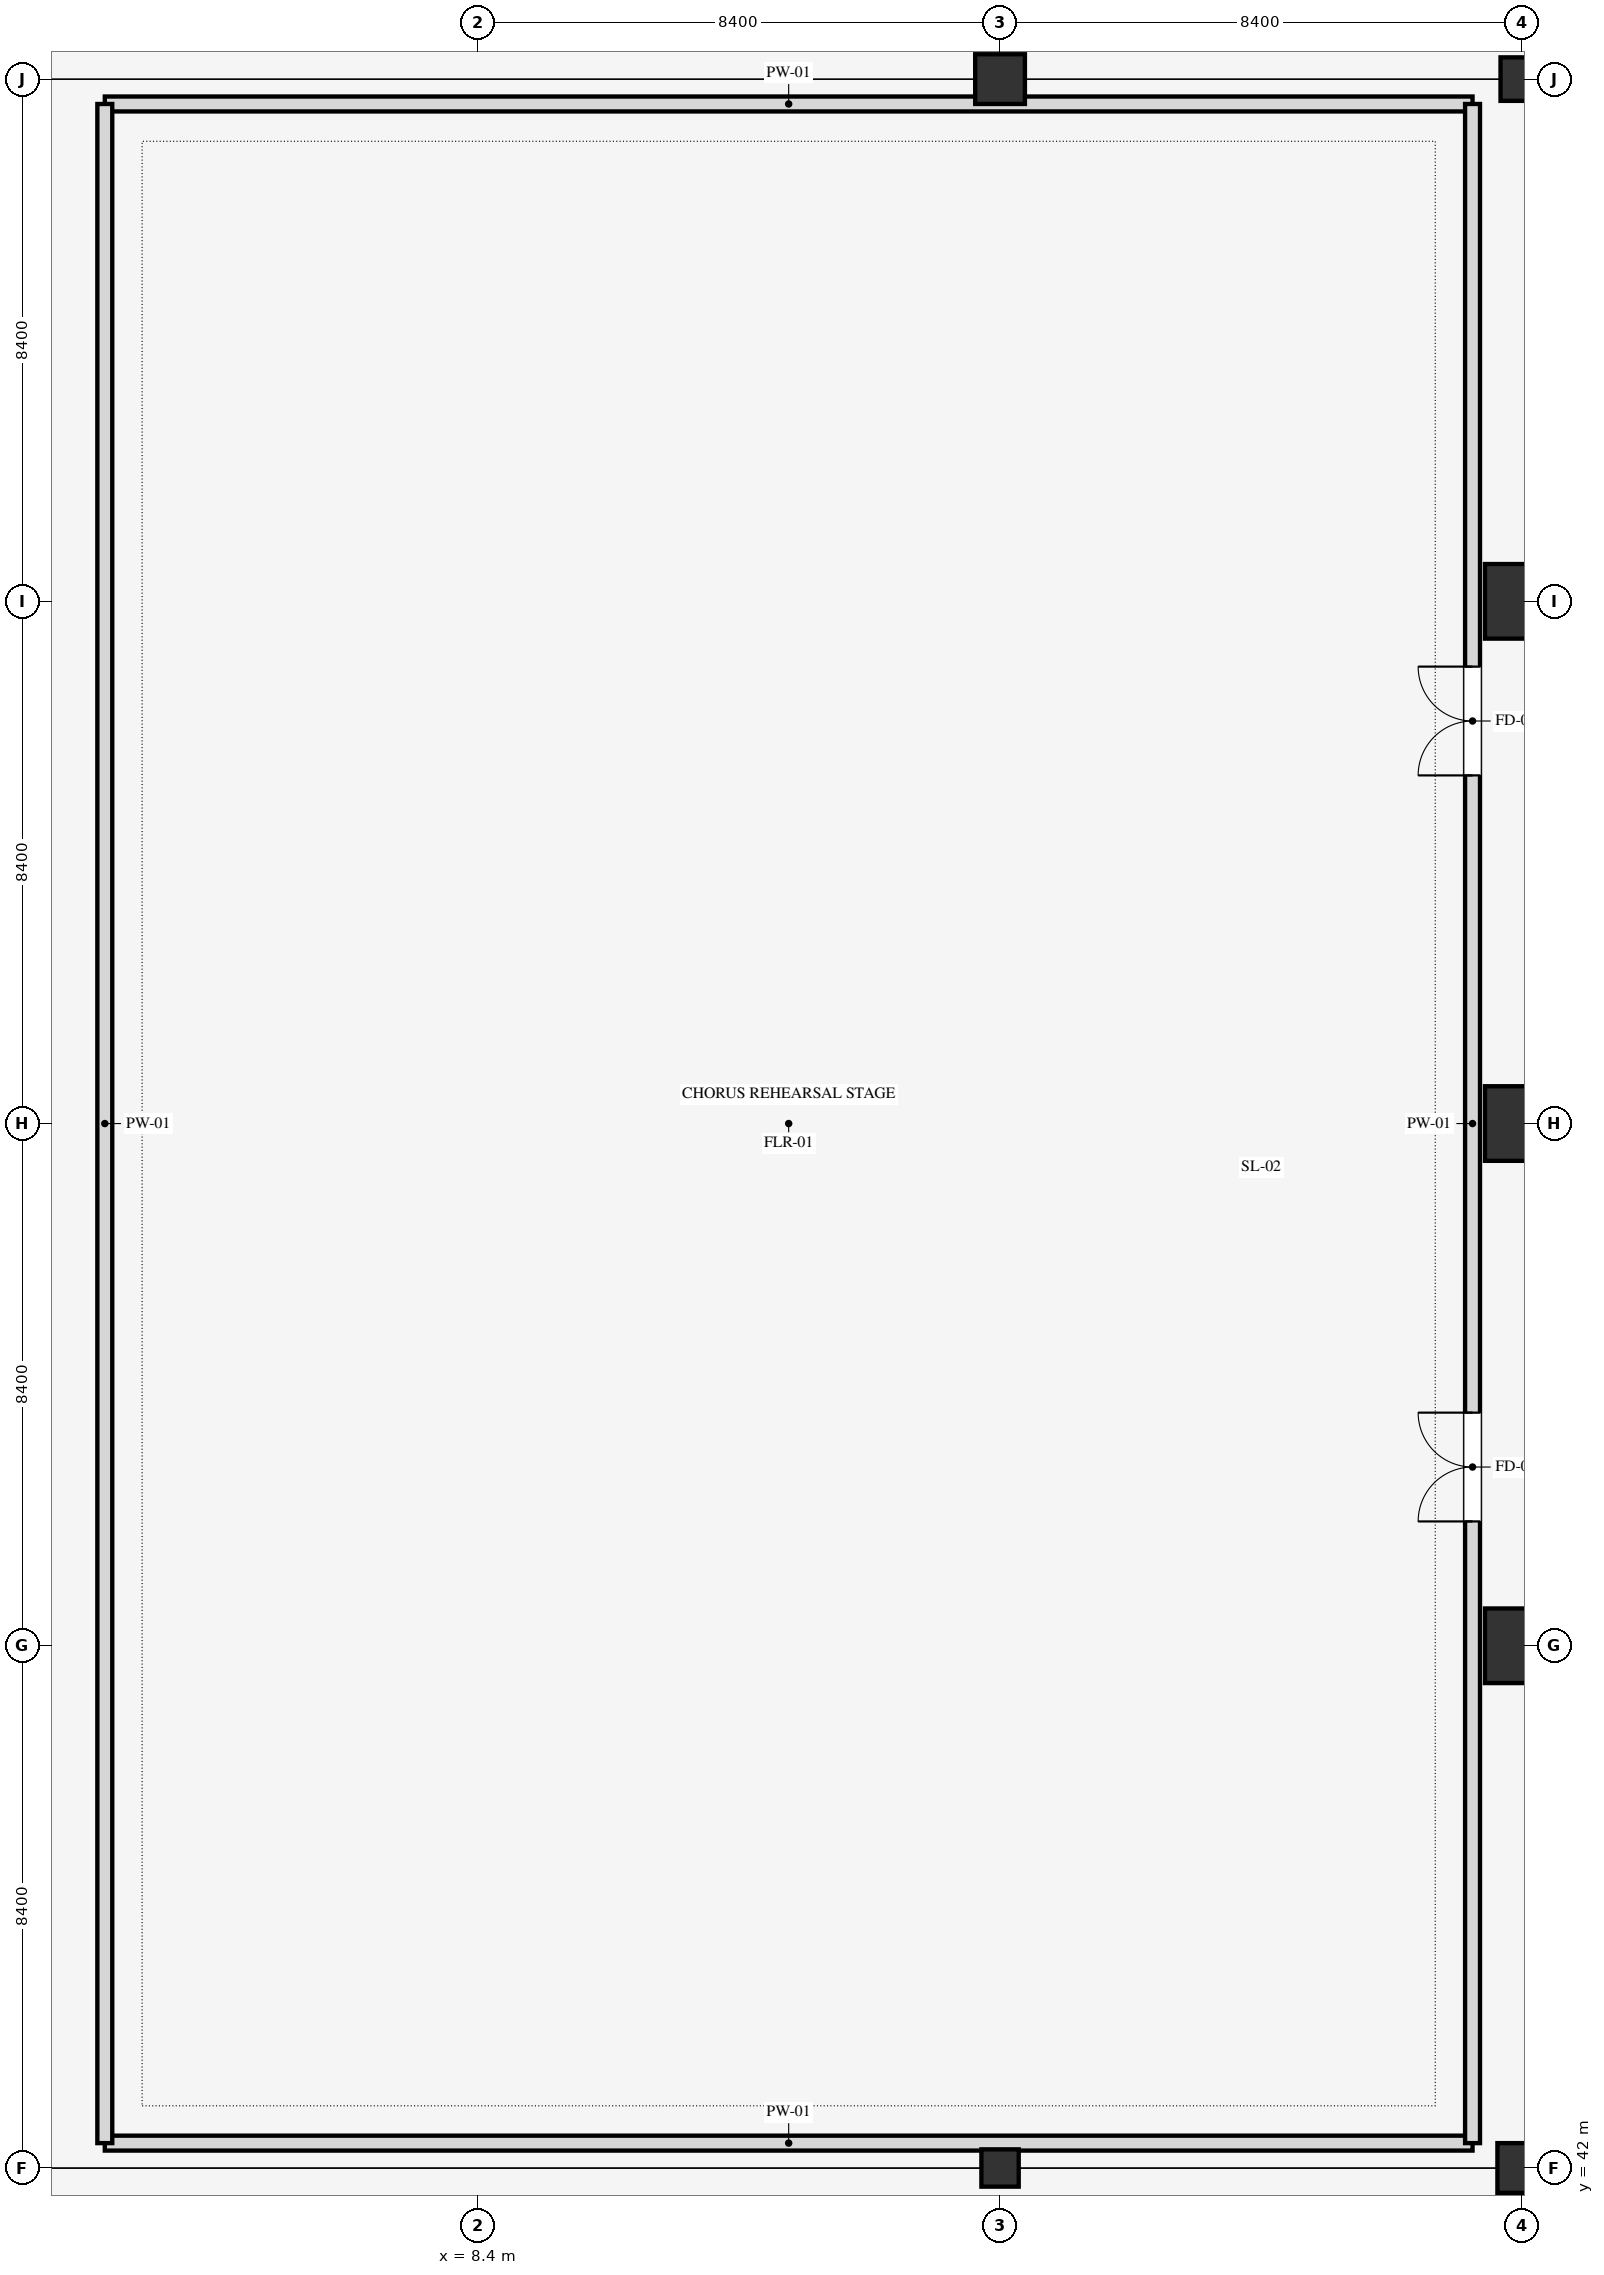
"""IFC4 building model, lengths in metres.
Left out: names, types, materials, properties, quantities, classifications, styles, units other than length and angle.
Written with IfcOpenShell. Run it as: python <this file> out.ifc"""

import sys

from ifc_helpers import new_model, si_unit, direction, frame, frame_2d, origin, origin_2d, place, context, subcontext, project, spatial, rectangle, extrude, element, fill, save


model = new_model("IFC4")
c1 = context("Model", 3, precision=1e-05, world=origin(), true_north=direction((0.0, 1.0)))
c2 = subcontext(c1, "Body", "Model", "MODEL_VIEW")
j1 = project(units=[si_unit("LENGTHUNIT", "METRE"), si_unit("PLANEANGLEUNIT", "RADIAN")], contexts=[c1])
p1 = place(None, origin())
s1 = spatial("IfcSite", under=j1, at=p1, CompositionType="ELEMENT")
p2 = place(p1, origin())
s2 = spatial("IfcBuilding", under=s1, at=p2, CompositionType="ELEMENT")
p3 = place(p2, frame((0.0, 0.0, 14.4)))
s3 = spatial("IfcBuildingStorey", under=s2, at=p3, CompositionType="ELEMENT", Elevation=14.4)
p4 = place(p3, frame((16.8, 42.0, 0.0), z_axis=(0.0, 0.0, 1.0), x_axis=(1.0, 0.0, 0.0)))
e1 = element("IfcColumn", 1, at=p4, inside=s3, PredefinedType="COLUMN", context=c2, shape_type="SweptSolid", body=[
    extrude(rectangle(XDim=0.6, YDim=0.6, at=origin_2d()), origin(), (0.0, 0.0, 1.0), 4.5),
])
for number, where, z_axis, x_axis in (
    (2, (16.8, 75.6, 0.0), (0.0, 0.0, 1.0), (1.0, 0.0, 0.0)),
    (3, (25.2, 42.0, 0.0), (0.0, 0.0, 1.0), (1.0, 0.0, 0.0)),
):
    element("IfcColumn", number, at=place(p3, frame(where, z_axis=z_axis, x_axis=x_axis)), inside=s3, PredefinedType="COLUMN", context=c2, shape_type="SweptSolid", body=[
        extrude(rectangle(XDim=0.8, YDim=0.8, at=origin_2d()), origin(), (0.0, 0.0, 1.0), 4.5),
    ])
for number, where, z_axis, x_axis in (
    (4, (25.2, 50.4, 0.0), (0.0, 0.0, 1.0), (1.0, 0.0, 0.0)),
    (5, (25.2, 58.8, 0.0), (0.0, 0.0, 1.0), (1.0, 0.0, 0.0)),
    (6, (25.2, 67.2, 0.0), (0.0, 0.0, 1.0), (1.0, 0.0, 0.0)),
):
    element("IfcColumn", number, at=place(p3, frame(where, z_axis=z_axis, x_axis=x_axis)), inside=s3, PredefinedType="COLUMN", context=c2, shape_type="SweptSolid", body=[
        extrude(rectangle(XDim=1.2, YDim=1.2, at=origin_2d()), origin(), (0.0, 0.0, 1.0), 4.5),
    ])
p5 = place(p3, frame((25.2, 75.6, 0.0), z_axis=(0.0, 0.0, 1.0), x_axis=(1.0, 0.0, 0.0)))
e7 = element("IfcColumn", 7, at=p5, inside=s3, PredefinedType="COLUMN", context=c2, shape_type="SweptSolid", body=[
    extrude(rectangle(XDim=0.7, YDim=0.7, at=origin_2d()), origin(), (0.0, 0.0, 1.0), 4.5),
])
for number, where, z_axis, x_axis in (
    (8, (2.4, 42.4, 0.0), (0.0, 0.0, 1.0), (1.0, 0.0, 0.0)),
    (9, (2.4, 75.2, 0.0), (0.0, 0.0, 1.0), (1.0, 0.0, 0.0)),
):
    element("IfcWall", number, at=place(p3, frame(where, z_axis=z_axis, x_axis=x_axis)), inside=s3, PredefinedType="PARTITIONING", context=c2, shape_type="SweptSolid", body=[
        extrude(rectangle(XDim=22.0, YDim=0.24, at=frame_2d((11.0, 0.0))), origin(), (0.0, 0.0, 1.0), 3.54),
    ])
p6 = place(p3, frame((2.4, 42.4, 0.0), z_axis=(0.0, 0.0, 1.0), x_axis=(0.0, 1.0, 0.0)))
e10 = element("IfcWall", 10, at=p6, inside=s3, PredefinedType="PARTITIONING", context=c2, shape_type="SweptSolid", body=[
    extrude(rectangle(XDim=32.8, YDim=0.24, at=frame_2d((16.4, 0.0))), origin(), (0.0, 0.0, 1.0), 3.54),
])
p7 = place(p3, frame((24.4, 42.4, 0.0), z_axis=(0.0, 0.0, 1.0), x_axis=(0.0, 1.0, 0.0)))
e11 = element("IfcWall", 11, at=p7, inside=s3, PredefinedType="PARTITIONING", context=c2, shape_type="SweptSolid", body=[
    extrude(rectangle(XDim=32.8, YDim=0.24, at=frame_2d((16.4, 0.0))), origin(), (0.0, 0.0, 1.0), 3.54),
])
p8 = place(p7, frame((10.0, 0.0, 0.0)))
e12 = element("IfcOpeningElement", 12, at=p8, cuts=e11, PredefinedType="OPENING", context=c2, shape_type="SweptSolid", body=[
    extrude(rectangle(XDim=1.75, YDim=2.2, at=frame_2d((0.875, 1.1))), frame((0.0, 0.13, 0.0), z_axis=(0.0, -1.0, 0.0), x_axis=(1.0, 0.0, 0.0)), (0.0, 0.0, 1.0), 0.26),
])
p9 = place(p7, frame((22.0, 0.0, 0.0)))
e13 = element("IfcOpeningElement", 13, at=p9, cuts=e11, PredefinedType="OPENING", context=c2, shape_type="SweptSolid", body=[
    extrude(rectangle(XDim=1.75, YDim=2.2, at=frame_2d((0.875, 1.1))), frame((0.0, 0.13, 0.0), z_axis=(0.0, -1.0, 0.0), x_axis=(1.0, 0.0, 0.0)), (0.0, 0.0, 1.0), 0.26),
])
p10 = place(p8, origin())
e14 = element("IfcDoor", 14, at=p10, inside=s3, OperationType="DOUBLE_DOOR_SINGLE_SWING", PredefinedType="DOOR", context=c2, shape_type="SweptSolid", body=[
    extrude(rectangle(XDim=1.75, YDim=2.2, at=frame_2d((0.875, 1.1))), frame((0.0, 0.025, 0.0), z_axis=(0.0, -1.0, 0.0), x_axis=(1.0, 0.0, 0.0)), (0.0, 0.0, 1.0), 0.05),
])
fill(e12, e14)
p11 = place(p9, origin())
e15 = element("IfcDoor", 15, at=p11, inside=s3, OperationType="DOUBLE_DOOR_SINGLE_SWING", PredefinedType="DOOR", context=c2, shape_type="SweptSolid", body=[
    extrude(rectangle(XDim=1.75, YDim=2.2, at=frame_2d((0.875, 1.1))), frame((0.0, 0.025, 0.0), z_axis=(0.0, -1.0, 0.0), x_axis=(1.0, 0.0, 0.0)), (0.0, 0.0, 1.0), 0.05),
])
fill(e13, e15)
save(model, sys.argv[1])
